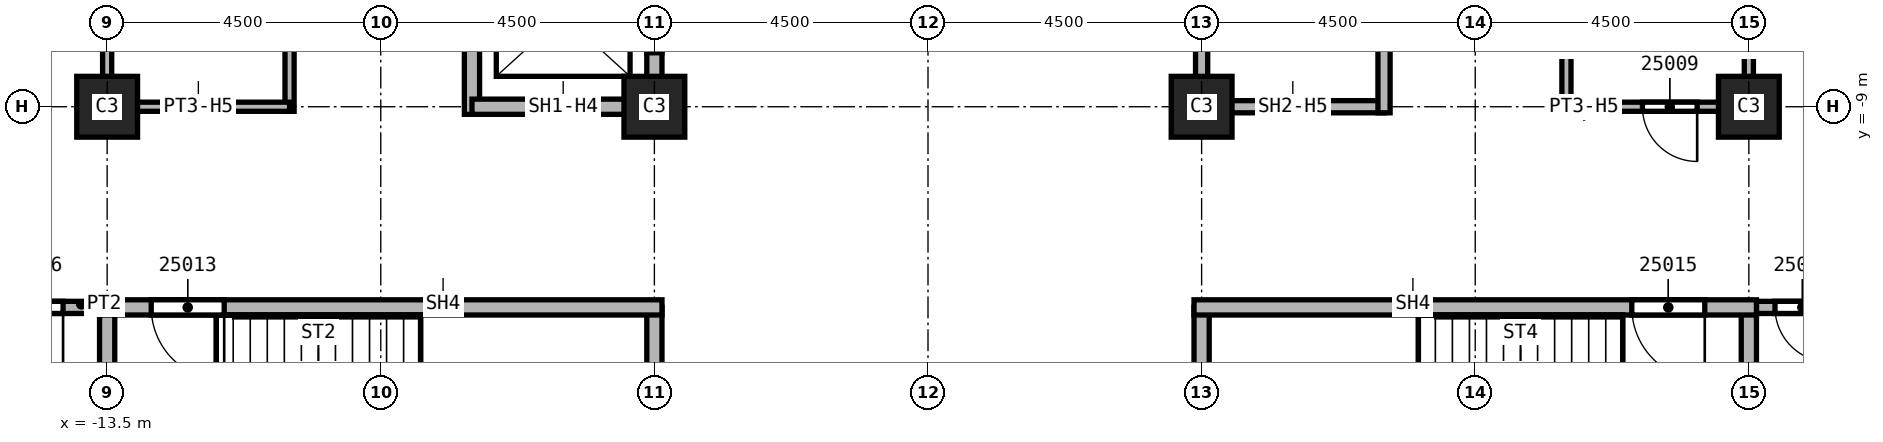
"""IFC4 building model, lengths in metres.
Left out: names, types, materials, properties, quantities, classifications, styles, units other than length and angle.
Written with IfcOpenShell. Run it as: python <this file> out.ifc"""

import sys

from ifc_helpers import new_model, si_unit, direction, frame, frame_2d, origin, origin_2d, place, context, subcontext, project, spatial, rectangle, extrude, element, fill, save


model = new_model("IFC4")
c1 = context("Model", 3, precision=1e-05, world=origin(), true_north=direction((0.0, 1.0)))
c2 = subcontext(c1, "Body", "Model", "MODEL_VIEW")
j1 = project(units=[si_unit("LENGTHUNIT", "METRE"), si_unit("PLANEANGLEUNIT", "RADIAN")], contexts=[c1])
p1 = place(None, origin())
s1 = spatial("IfcSite", under=j1, at=p1, CompositionType="ELEMENT")
p2 = place(p1, origin())
s2 = spatial("IfcBuilding", under=s1, at=p2, CompositionType="ELEMENT")
p3 = place(p2, frame((0.0, 0.0, 60.0)))
s3 = spatial("IfcBuildingStorey", under=s2, at=p3, CompositionType="ELEMENT", Elevation=60.0)
for number, where, z_axis, x_axis in (
    (1, (4.5, -9.0, 0.0), (0.0, 0.0, 1.0), (1.0, 0.0, 0.0)),
    (2, (13.5, -9.0, 0.0), (0.0, 0.0, 1.0), (1.0, 0.0, 0.0)),
    (3, (-4.5, -9.0, 0.0), (0.0, 0.0, 1.0), (1.0, 0.0, 0.0)),
    (4, (-13.5, -9.0, 0.0), (0.0, 0.0, 1.0), (1.0, 0.0, 0.0)),
):
    element("IfcColumn", number, at=place(p3, frame(where, z_axis=z_axis, x_axis=x_axis)), inside=s3, PredefinedType="COLUMN", context=c2, shape_type="SweptSolid", body=[
        extrude(rectangle(XDim=1.0, YDim=1.0, at=origin_2d()), origin(), (0.0, 0.0, 1.0), 7.7),
    ])
p4 = place(p3, frame((-13.375, -12.3, 0.0), z_axis=(0.0, 0.0, 1.0), x_axis=(-1.0, 0.0, 0.0)))
e5 = element("IfcWall", 5, at=p4, inside=s3, PredefinedType="PARTITIONING", context=c2, shape_type="SweptSolid", body=[
    extrude(rectangle(XDim=2.125, YDim=0.2, at=frame_2d((1.062, 0.0))), origin(), (0.0, 0.0, 1.0), 7.7),
])
p5 = place(p4, frame((0.85, 0.0, 0.0)))
e6 = element("IfcOpeningElement", 6, at=p5, cuts=e5, PredefinedType="OPENING", context=c2, shape_type="SweptSolid", body=[
    extrude(rectangle(XDim=1.0, YDim=2.1, at=frame_2d((0.5, 1.05))), frame((0.0, 0.1, 0.0), z_axis=(0.0, -1.0, 0.0), x_axis=(1.0, 0.0, 0.0)), (0.0, 0.0, 1.0), 0.2),
])
p6 = place(p3, frame((15.5, -12.3, 0.0), z_axis=(0.0, 0.0, 1.0), x_axis=(-1.0, 0.0, 0.0)))
e7 = element("IfcWall", 7, at=p6, inside=s3, PredefinedType="PARTITIONING", context=c2, shape_type="SweptSolid", body=[
    extrude(rectangle(XDim=2.125, YDim=0.2, at=frame_2d((1.062, 0.0))), origin(), (0.0, 0.0, 1.0), 7.7),
])
p7 = place(p6, frame((0.67, 0.0, 0.0)))
e8 = element("IfcOpeningElement", 8, at=p7, cuts=e7, PredefinedType="OPENING", context=c2, shape_type="SweptSolid", body=[
    extrude(rectangle(XDim=0.9, YDim=2.1, at=frame_2d((0.45, 1.05))), frame((0.0, 0.1, 0.0), z_axis=(0.0, -1.0, 0.0), x_axis=(1.0, 0.0, 0.0)), (0.0, 0.0, 1.0), 0.2),
])
p8 = place(p3, frame((4.5, -9.1, 0.0), z_axis=(0.0, 0.0, 1.0), x_axis=(0.0, 1.0, 0.0)))
e9 = element("IfcWall", 9, at=p8, inside=s3, PredefinedType="SOLIDWALL", context=c2, shape_type="SweptSolid", body=[
    extrude(rectangle(XDim=9.1, YDim=0.2, at=frame_2d((4.55, 0.0))), origin(), (0.0, 0.0, 1.0), 6.938),
])
p9 = place(p8, frame((4.0, 0.0, 0.0)))
e10 = element("IfcOpeningElement", 10, at=p9, cuts=e9, PredefinedType="OPENING", context=c2, shape_type="SweptSolid", body=[
    extrude(rectangle(XDim=1.1, YDim=2.1, at=frame_2d((0.55, 1.05))), frame((0.0, 0.1, 0.0), z_axis=(0.0, -1.0, 0.0), x_axis=(1.0, 0.0, 0.0)), (0.0, 0.0, 1.0), 0.2),
])
p10 = place(p3, frame((7.5, -9.0, 0.0), z_axis=(0.0, 0.0, 1.0), x_axis=(-1.0, 0.0, 0.0)))
e11 = element("IfcWall", 11, at=p10, inside=s3, PredefinedType="SOLIDWALL", context=c2, shape_type="SweptSolid", body=[
    extrude(rectangle(XDim=3.0, YDim=0.2, at=frame_2d((1.5, 0.0))), origin(), (0.0, 0.0, 1.0), 6.938),
])
p11 = place(p3, frame((7.5, -2.875, 0.0), z_axis=(0.0, 0.0, 1.0), x_axis=(0.0, -1.0, 0.0)))
e12 = element("IfcWall", 12, at=p11, inside=s3, PredefinedType="SOLIDWALL", context=c2, shape_type="SweptSolid", body=[
    extrude(rectangle(XDim=6.225, YDim=0.2, at=frame_2d((3.113, 0.0))), origin(), (0.0, 0.0, 1.0), 7.7),
])
p12 = place(p3, frame((-7.5, -9.125, 0.0), z_axis=(0.0, 0.0, 1.0), x_axis=(0.0, 1.0, 0.0)))
e13 = element("IfcWall", 13, at=p12, inside=s3, PredefinedType="SOLIDWALL", context=c2, shape_type="SweptSolid", body=[
    extrude(rectangle(XDim=12.25, YDim=0.25, at=frame_2d((6.125, 0.0))), origin(), (0.0, 0.0, 1.0), 7.7),
])
p13 = place(p3, frame((-4.5, -9.0, 0.0), z_axis=(0.0, 0.0, 1.0), x_axis=(-1.0, 0.0, 0.0)))
e14 = element("IfcWall", 14, at=p13, inside=s3, PredefinedType="SOLIDWALL", context=c2, shape_type="SweptSolid", body=[
    extrude(rectangle(XDim=3.0, YDim=0.25, at=frame_2d((1.5, 0.0))), origin(), (0.0, 0.0, 1.0), 6.938),
])
p14 = place(p3, frame((-4.5, 0.0, 0.0), z_axis=(0.0, 0.0, 1.0), x_axis=(0.0, -1.0, 0.0)))
e15 = element("IfcWall", 15, at=p14, inside=s3, PredefinedType="SOLIDWALL", context=c2, shape_type="SweptSolid", body=[
    extrude(rectangle(XDim=9.125, YDim=0.25, at=frame_2d((4.562, 0.0))), origin(), (0.0, 0.0, 1.0), 6.938),
])
p15 = place(p14, frame((7.012, 0.0, 0.0)))
e16 = element("IfcOpeningElement", 16, at=p15, cuts=e15, PredefinedType="OPENING", context=c2, shape_type="SweptSolid", body=[
    extrude(rectangle(XDim=1.1, YDim=2.1, at=frame_2d((0.55, 1.05))), frame((0.0, 0.125, 0.0), z_axis=(0.0, -1.0, 0.0), x_axis=(1.0, 0.0, 0.0)), (0.0, 0.0, 1.0), 0.25),
])
p16 = place(p14, frame((3.95, 0.0, 0.0)))
e17 = element("IfcOpeningElement", 17, at=p16, cuts=e15, PredefinedType="OPENING", context=c2, shape_type="SweptSolid", body=[
    extrude(rectangle(XDim=1.1, YDim=2.1, at=frame_2d((0.55, 1.05))), frame((0.0, 0.125, 0.0), z_axis=(0.0, -1.0, 0.0), x_axis=(1.0, 0.0, 0.0)), (0.0, 0.0, 1.0), 0.25),
])
p17 = place(p14, frame((0.95, 0.0, 0.0)))
e18 = element("IfcOpeningElement", 18, at=p17, cuts=e15, PredefinedType="OPENING", context=c2, shape_type="SweptSolid", body=[
    extrude(rectangle(XDim=1.1, YDim=2.1, at=frame_2d((0.55, 1.05))), frame((0.0, 0.125, 0.0), z_axis=(0.0, -1.0, 0.0), x_axis=(1.0, 0.0, 0.0)), (0.0, 0.0, 1.0), 0.25),
])
p18 = place(p3, frame((-13.5, -16.925, 0.0), z_axis=(0.0, 0.0, 1.0), x_axis=(0.0, 1.0, 0.0)))
e19 = element("IfcWall", 19, at=p18, inside=s3, PredefinedType="SOLIDWALL", context=c2, shape_type="SweptSolid", body=[
    extrude(rectangle(XDim=4.625, YDim=0.25, at=frame_2d((2.312, 0.0))), origin(), (0.0, 0.0, 1.0), 7.7),
])
p19 = place(p3, frame((-4.5, -12.3, 0.0), z_axis=(0.0, 0.0, 1.0), x_axis=(0.0, -1.0, 0.0)))
e20 = element("IfcWall", 20, at=p19, inside=s3, PredefinedType="SOLIDWALL", context=c2, shape_type="SweptSolid", body=[
    extrude(rectangle(XDim=4.5, YDim=0.25, at=frame_2d((2.25, 0.0))), origin(), (0.0, 0.0, 1.0), 7.7),
])
p20 = place(p3, frame((-4.375, -12.3, 0.0), z_axis=(0.0, 0.0, 1.0), x_axis=(-1.0, 0.0, 0.0)))
e21 = element("IfcWall", 21, at=p20, inside=s3, PredefinedType="SOLIDWALL", context=c2, shape_type="SweptSolid", body=[
    extrude(rectangle(XDim=9.25, YDim=0.25, at=frame_2d((4.625, 0.0))), origin(), (0.0, 0.0, 1.0), 7.7),
])
p21 = place(p20, frame((7.2, 0.0, 0.0)))
e22 = element("IfcOpeningElement", 22, at=p21, cuts=e21, PredefinedType="OPENING", context=c2, shape_type="SweptSolid", body=[
    extrude(rectangle(XDim=1.2, YDim=2.1, at=frame_2d((0.6, 1.05))), frame((0.0, 0.125, 0.0), z_axis=(0.0, -1.0, 0.0), x_axis=(1.0, 0.0, 0.0)), (0.0, 0.0, 1.0), 0.25),
])
p22 = place(p3, frame((4.5, -16.8, 0.0), z_axis=(0.0, 0.0, 1.0), x_axis=(0.0, 1.0, 0.0)))
e23 = element("IfcWall", 23, at=p22, inside=s3, PredefinedType="SOLIDWALL", context=c2, shape_type="SweptSolid", body=[
    extrude(rectangle(XDim=4.5, YDim=0.25, at=frame_2d((2.25, 0.0))), origin(), (0.0, 0.0, 1.0), 7.7),
])
p23 = place(p3, frame((13.5, -12.3, 0.0), z_axis=(0.0, 0.0, 1.0), x_axis=(0.0, -1.0, 0.0)))
e24 = element("IfcWall", 24, at=p23, inside=s3, PredefinedType="SOLIDWALL", context=c2, shape_type="SweptSolid", body=[
    extrude(rectangle(XDim=4.625, YDim=0.25, at=frame_2d((2.312, 0.0))), origin(), (0.0, 0.0, 1.0), 7.7),
])
p24 = place(p3, frame((13.625, -12.3, 0.0), z_axis=(0.0, 0.0, 1.0), x_axis=(-1.0, 0.0, 0.0)))
e25 = element("IfcWall", 25, at=p24, inside=s3, PredefinedType="SOLIDWALL", context=c2, shape_type="SweptSolid", body=[
    extrude(rectangle(XDim=9.25, YDim=0.25, at=frame_2d((4.625, 0.0))), origin(), (0.0, 0.0, 1.0), 7.7),
])
p25 = place(p24, frame((0.85, 0.0, 0.0)))
e26 = element("IfcOpeningElement", 26, at=p25, cuts=e25, PredefinedType="OPENING", context=c2, shape_type="SweptSolid", body=[
    extrude(rectangle(XDim=1.2, YDim=2.1, at=frame_2d((0.6, 1.05))), frame((0.0, 0.125, 0.0), z_axis=(0.0, -1.0, 0.0), x_axis=(1.0, 0.0, 0.0)), (0.0, 0.0, 1.0), 0.25),
])
p26 = place(p3, frame((-13.5, -9.075, 0.0), z_axis=(0.0, 0.0, 1.0), x_axis=(0.0, 1.0, 0.0)))
e27 = element("IfcWall", 27, at=p26, inside=s3, PredefinedType="PARTITIONING", context=c2, shape_type="SweptSolid", body=[
    extrude(rectangle(XDim=6.075, YDim=0.15, at=frame_2d((3.038, 0.0))), origin(), (0.0, 0.0, 1.0), 6.938),
])
p27 = place(p3, frame((-10.5, -9.075, 0.0), z_axis=(0.0, 0.0, 1.0), x_axis=(0.0, 1.0, 0.0)))
e28 = element("IfcWall", 28, at=p27, inside=s3, PredefinedType="PARTITIONING", context=c2, shape_type="SweptSolid", body=[
    extrude(rectangle(XDim=6.2, YDim=0.15, at=frame_2d((3.1, 0.0))), origin(), (0.0, 0.0, 1.0), 7.7),
])
p28 = place(p27, frame((4.45, 0.0, 0.0)))
e29 = element("IfcOpeningElement", 29, at=p28, cuts=e28, PredefinedType="OPENING", context=c2, shape_type="SweptSolid", body=[
    extrude(rectangle(XDim=0.9, YDim=2.1, at=frame_2d((0.45, 1.05))), frame((0.0, 0.075, 0.0), z_axis=(0.0, -1.0, 0.0), x_axis=(1.0, 0.0, 0.0)), (0.0, 0.0, 1.0), 0.15),
])
p29 = place(p3, frame((-10.5, -9.0, 0.0), z_axis=(0.0, 0.0, 1.0), x_axis=(-1.0, 0.0, 0.0)))
e30 = element("IfcWall", 30, at=p29, inside=s3, PredefinedType="PARTITIONING", context=c2, shape_type="SweptSolid", body=[
    extrude(rectangle(XDim=3.0, YDim=0.15, at=frame_2d((1.5, 0.0))), origin(), (0.0, 0.0, 1.0), 6.938),
])
p30 = place(p3, frame((10.5, -6.925, 0.0), z_axis=(0.0, 0.0, 1.0), x_axis=(0.0, -1.0, 0.0)))
e31 = element("IfcWall", 31, at=p30, inside=s3, PredefinedType="PARTITIONING", context=c2, shape_type="SweptSolid", body=[
    extrude(rectangle(XDim=2.15, YDim=0.15, at=frame_2d((1.075, 0.0))), origin(), (0.0, 0.0, 1.0), 7.7),
])
p31 = place(p3, frame((13.5, -9.0, 0.0), z_axis=(0.0, 0.0, 1.0), x_axis=(-1.0, 0.0, 0.0)))
e32 = element("IfcWall", 32, at=p31, inside=s3, PredefinedType="PARTITIONING", context=c2, shape_type="SweptSolid", body=[
    extrude(rectangle(XDim=3.0, YDim=0.15, at=frame_2d((1.5, 0.0))), origin(), (0.0, 0.0, 1.0), 6.938),
])
p32 = place(p31, frame((0.85, 0.0, 0.0)))
e33 = element("IfcOpeningElement", 33, at=p32, cuts=e32, PredefinedType="OPENING", context=c2, shape_type="SweptSolid", body=[
    extrude(rectangle(XDim=0.9, YDim=2.1, at=frame_2d((0.45, 1.05))), frame((0.0, 0.075, 0.0), z_axis=(0.0, -1.0, 0.0), x_axis=(1.0, 0.0, 0.0)), (0.0, 0.0, 1.0), 0.15),
])
p33 = place(p3, frame((13.5, -7.0, 0.0), z_axis=(0.0, 0.0, 1.0), x_axis=(0.0, -1.0, 0.0)))
e34 = element("IfcWall", 34, at=p33, inside=s3, PredefinedType="PARTITIONING", context=c2, shape_type="SweptSolid", body=[
    extrude(rectangle(XDim=2.075, YDim=0.15, at=frame_2d((1.038, 0.0))), origin(), (0.0, 0.0, 1.0), 6.938),
])
p34 = place(p32, origin())
e35 = element("IfcDoor", 35, at=p34, inside=s3, OperationType="SINGLE_SWING_RIGHT", PredefinedType="DOOR", context=c2, shape_type="SweptSolid", body=[
    extrude(rectangle(XDim=0.9, YDim=2.1, at=frame_2d((0.45, 1.05))), frame((0.0, 0.025, 0.0), z_axis=(0.0, -1.0, 0.0), x_axis=(1.0, 0.0, 0.0)), (0.0, 0.0, 1.0), 0.05),
])
fill(e33, e35)
p35 = place(p21, origin())
e36 = element("IfcDoor", 36, at=p35, inside=s3, OperationType="SINGLE_SWING_RIGHT", PredefinedType="DOOR", context=c2, shape_type="SweptSolid", body=[
    extrude(rectangle(XDim=1.2, YDim=2.1, at=frame_2d((0.6, 1.05))), frame((0.0, 0.025, 0.0), z_axis=(0.0, -1.0, 0.0), x_axis=(1.0, 0.0, 0.0)), (0.0, 0.0, 1.0), 0.05),
])
fill(e22, e36)
p36 = place(p25, origin())
e37 = element("IfcDoor", 37, at=p36, inside=s3, OperationType="SINGLE_SWING_RIGHT", PredefinedType="DOOR", context=c2, shape_type="SweptSolid", body=[
    extrude(rectangle(XDim=1.2, YDim=2.1, at=frame_2d((0.6, 1.05))), frame((0.0, 0.025, 0.0), z_axis=(0.0, -1.0, 0.0), x_axis=(1.0, 0.0, 0.0)), (0.0, 0.0, 1.0), 0.05),
])
fill(e26, e37)
p37 = place(p5, origin())
e38 = element("IfcDoor", 38, at=p37, inside=s3, OperationType="SINGLE_SWING_LEFT", PredefinedType="DOOR", context=c2, shape_type="SweptSolid", body=[
    extrude(rectangle(XDim=1.0, YDim=2.1, at=frame_2d((0.5, 1.05))), frame((0.0, 0.025, 0.0), z_axis=(0.0, -1.0, 0.0), x_axis=(1.0, 0.0, 0.0)), (0.0, 0.0, 1.0), 0.05),
])
fill(e6, e38)
p38 = place(p7, origin())
e39 = element("IfcDoor", 39, at=p38, inside=s3, OperationType="SINGLE_SWING_LEFT", PredefinedType="DOOR", context=c2, shape_type="SweptSolid", body=[
    extrude(rectangle(XDim=0.9, YDim=2.1, at=frame_2d((0.45, 1.05))), frame((0.0, 0.025, 0.0), z_axis=(0.0, -1.0, 0.0), x_axis=(1.0, 0.0, 0.0)), (0.0, 0.0, 1.0), 0.05),
])
fill(e8, e39)
p39 = place(p15, origin())
e40 = element("IfcDoor", 40, at=p39, inside=s3, OperationType="SLIDING_TO_LEFT", PredefinedType="DOOR", context=c2, shape_type="SweptSolid", body=[
    extrude(rectangle(XDim=1.1, YDim=2.1, at=frame_2d((0.55, 1.05))), frame((0.0, 0.025, 0.0), z_axis=(0.0, -1.0, 0.0), x_axis=(1.0, 0.0, 0.0)), (0.0, 0.0, 1.0), 0.05),
])
fill(e16, e40)
save(model, sys.argv[1])
